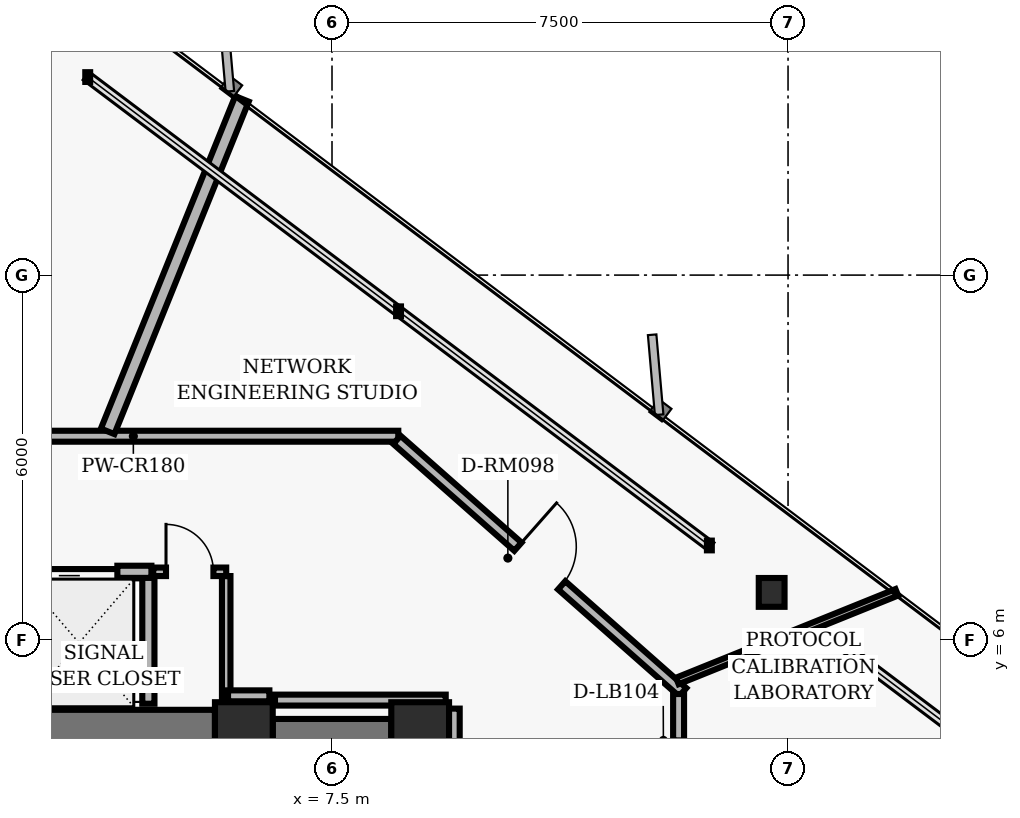
"""IFC4 building model, lengths in metres.
Left out: names, types, materials, properties, quantities, classifications, styles, units other than length and angle.
Written with IfcOpenShell. Run it as: python <this file> out.ifc"""

import sys

from ifc_helpers import new_model, si_unit, direction, frame, frame_2d, origin, origin_2d, place, context, subcontext, project, spatial, rectangle, hollow_rectangle, i_section, extrude, element, fill, save


model = new_model("IFC4")
c1 = context("Model", 3, precision=1e-05, world=origin(), true_north=direction((0.0, 1.0)))
c2 = subcontext(c1, "Body", "Model", "MODEL_VIEW")
j1 = project(units=[si_unit("LENGTHUNIT", "METRE"), si_unit("PLANEANGLEUNIT", "RADIAN")], contexts=[c1])
p1 = place(None, origin())
s1 = spatial("IfcSite", under=j1, at=p1, CompositionType="ELEMENT")
p2 = place(p1, origin())
s2 = spatial("IfcBuilding", under=s1, at=p2, CompositionType="ELEMENT")
p3 = place(p2, frame((0.0, 0.0, 49.6)))
s3 = spatial("IfcBuildingStorey", under=s2, at=p3, CompositionType="ELEMENT", Elevation=49.6)
for number, where, z_axis, x_axis in (
    (1, (6.05, 4.5, 0.0), (0.0, 0.0, 1.0), (1.0, 0.0, 0.0)),
    (2, (8.95, 4.5, 0.0), (0.0, 0.0, 1.0), (1.0, 0.0, 0.0)),
):
    element("IfcColumn", number, at=place(p3, frame(where, z_axis=z_axis, x_axis=x_axis)), inside=s3, PredefinedType="COLUMN", context=c2, shape_type="SweptSolid", body=[
        extrude(hollow_rectangle(XDim=0.95, YDim=0.95, WallThickness=0.06, InnerFilletRadius=0.02, OuterFilletRadius=0.04, at=origin_2d()), origin(), (0.0, 0.0, 1.0), 3.36),
    ])
p4 = place(p3, frame((2.05, 4.5, 0.0), z_axis=(0.0, 0.0, 1.0), x_axis=(1.0, 0.0, 0.0)))
e3 = element("IfcWall", 3, at=p4, inside=s3, PredefinedType="SHEAR", context=c2, shape_type="SweptSolid", body=[
    extrude(rectangle(XDim=3.525, YDim=0.7, at=frame_2d((1.762, 0.0))), origin(), (0.0, 0.0, 1.0), 3.098),
])
p5 = place(p3, frame((6.525, 4.5, 0.0), z_axis=(0.0, 0.0, 1.0), x_axis=(1.0, 0.0, 0.0)))
e4 = element("IfcWall", 4, at=p5, inside=s3, PredefinedType="SHEAR", context=c2, shape_type="SweptSolid", body=[
    extrude(rectangle(XDim=1.95, YDim=0.4, at=frame_2d((0.975, 0.0))), origin(), (0.0, 0.0, 1.0), 3.098),
])
p6 = place(p3, frame((14.73, 6.781, 0.0), z_axis=(0.0, 0.0, 1.0), x_axis=(1.0, 0.0, 0.0)))
e5 = element("IfcColumn", 5, at=p6, inside=s3, PredefinedType="COLUMN", context=c2, shape_type="SweptSolid", body=[
    extrude(i_section(OverallWidth=0.424, OverallDepth=0.474, WebThickness=0.048, FlangeThickness=0.077, FilletRadius=0.025, at=origin_2d()), origin(), (0.0, 0.0, 1.0), 3.36),
])
p7 = place(p3, frame((4.48, 4.95, 0.0), z_axis=(0.0, 0.0, 1.0), x_axis=(0.0, 1.0, 0.0)))
e6 = element("IfcWall", 6, at=p7, inside=s3, PredefinedType="PARTITIONING", context=c2, shape_type="SweptSolid", body=[
    extrude(rectangle(XDim=2.1, YDim=0.2, at=frame_2d((1.05, 0.0))), origin(), (0.0, 0.0, 1.0), 3.073),
])
p8 = place(p3, frame((2.15, 7.12, 0.0), z_axis=(0.0, 0.0, 1.0), x_axis=(1.0, 0.0, 0.0)))
e7 = element("IfcWall", 7, at=p8, inside=s3, PredefinedType="PARTITIONING", context=c2, shape_type="SweptSolid", body=[
    extrude(rectangle(XDim=2.38, YDim=0.2, at=frame_2d((1.19, 0.0))), origin(), (0.0, 0.0, 1.0), 2.587),
])
p9 = place(p8, frame((0.56, 0.0, 0.0)))
e8 = element("IfcOpeningElement", 8, at=p9, cuts=e7, PredefinedType="OPENING", context=c2, shape_type="SweptSolid", body=[
    extrude(rectangle(XDim=1.26, YDim=2.06, at=frame_2d((0.63, 1.03))), frame((0.0, 0.11, 0.0), z_axis=(0.0, -1.0, 0.0), x_axis=(1.0, 0.0, 0.0)), (0.0, 0.0, 1.0), 0.22),
])
p10 = place(p3, frame((5.76, 4.95, 0.0), z_axis=(0.0, 0.0, 1.0), x_axis=(0.0, 1.0, 0.0)))
e9 = element("IfcWall", 9, at=p10, inside=s3, PredefinedType="PARTITIONING", context=c2, shape_type="SweptSolid", body=[
    extrude(rectangle(XDim=2.1, YDim=0.14, at=frame_2d((1.05, 0.0))), origin(), (0.0, 0.0, 1.0), 3.073),
])
p11 = place(p3, frame((4.56, 7.12, 0.0), z_axis=(0.0, 0.0, 1.0), x_axis=(1.0, 0.0, 0.0)))
e10 = element("IfcWall", 10, at=p11, inside=s3, PredefinedType="PARTITIONING", context=c2, shape_type="SweptSolid", body=[
    extrude(rectangle(XDim=1.2, YDim=0.14, at=frame_2d((0.6, 0.0))), origin(), (0.0, 0.0, 1.0), 2.587),
])
p12 = place(p11, frame((0.21, 0.0, 0.0)))
e11 = element("IfcOpeningElement", 11, at=p12, cuts=e10, PredefinedType="OPENING", context=c2, shape_type="SweptSolid", body=[
    extrude(rectangle(XDim=0.78, YDim=2.01, at=frame_2d((0.39, 1.005))), frame((0.0, 0.08, 0.0), z_axis=(0.0, -1.0, 0.0), x_axis=(1.0, 0.0, 0.0)), (0.0, 0.0, 1.0), 0.16),
])
p13 = place(p3, frame((-8.59, 9.35, 0.0), z_axis=(0.0, 0.0, 1.0), x_axis=(1.0, 0.0, 0.0)))
e12 = element("IfcWall", 12, at=p13, inside=s3, PredefinedType="PARTITIONING", context=c2, shape_type="SweptSolid", body=[
    extrude(rectangle(XDim=17.18, YDim=0.18, at=frame_2d((8.59, 0.0))), origin(), (0.0, 0.0, 1.0), 3.073),
])
p14 = place(p13, frame((7.506, 0.0, 0.0)))
e13 = element("IfcOpeningElement", 13, at=p14, cuts=e12, PredefinedType="OPENING", context=c2, shape_type="SweptSolid", body=[
    extrude(rectangle(XDim=0.96, YDim=2.02, at=frame_2d((0.48, 1.01))), frame((0.0, 0.1, 0.0), z_axis=(0.0, -1.0, 0.0), x_axis=(1.0, 0.0, 0.0)), (0.0, 0.0, 1.0), 0.2),
])
p15 = place(p3, frame((8.567, 9.29, 0.0), z_axis=(0.0, 0.0, 1.0), x_axis=(0.749626463267, -0.66186113768, 0.0)))
e14 = element("IfcWall", 14, at=p15, inside=s3, PredefinedType="PARTITIONING", context=c2, shape_type="SweptSolid", body=[
    extrude(rectangle(XDim=6.27, YDim=0.18, at=frame_2d((3.135, 0.0))), origin(), (0.0, 0.0, 1.0), 2.587),
])
p16 = place(p15, frame((2.655, 0.0, 0.0)))
e15 = element("IfcOpeningElement", 15, at=p16, cuts=e14, PredefinedType="OPENING", context=c2, shape_type="SweptSolid", body=[
    extrude(rectangle(XDim=0.96, YDim=2.02, at=frame_2d((0.48, 1.01))), frame((0.0, 0.1, 0.0), z_axis=(0.0, -1.0, 0.0), x_axis=(1.0, 0.0, 0.0)), (0.0, 0.0, 1.0), 0.2),
])
p17 = place(p3, frame((13.2, 5.11, 0.0), z_axis=(0.0, 0.0, 1.0), x_axis=(0.0, -1.0, 0.0)))
e16 = element("IfcWall", 16, at=p17, inside=s3, PredefinedType="PARTITIONING", context=c2, shape_type="SweptSolid", body=[
    extrude(rectangle(XDim=10.22, YDim=0.18, at=frame_2d((5.11, 0.0))), origin(), (0.0, 0.0, 1.0), 3.073),
])
p18 = place(p17, frame((5.644, 0.0, 0.0)))
e17 = element("IfcOpeningElement", 17, at=p18, cuts=e16, PredefinedType="OPENING", context=c2, shape_type="SweptSolid", body=[
    extrude(rectangle(XDim=0.96, YDim=2.02, at=frame_2d((0.48, 1.01))), frame((0.0, 0.1, 0.0), z_axis=(0.0, -1.0, 0.0), x_axis=(1.0, 0.0, 0.0)), (0.0, 0.0, 1.0), 0.2),
])
p19 = place(p17, frame((0.763, 0.0, 0.0)))
e18 = element("IfcOpeningElement", 18, at=p19, cuts=e16, PredefinedType="OPENING", context=c2, shape_type="SweptSolid", body=[
    extrude(rectangle(XDim=1.02, YDim=2.02, at=frame_2d((0.51, 1.01))), frame((0.0, 0.1, 0.0), z_axis=(0.0, -1.0, 0.0), x_axis=(1.0, 0.0, 0.0)), (0.0, 0.0, 1.0), 0.2),
])
p20 = place(p3, frame((9.51, -4.87, 0.0), z_axis=(0.0, 0.0, 1.0), x_axis=(0.0, 1.0, 0.0)))
e19 = element("IfcWall", 19, at=p20, inside=s3, PredefinedType="PARTITIONING", context=c2, shape_type="SweptSolid", body=[
    extrude(rectangle(XDim=9.74, YDim=0.18, at=frame_2d((4.87, 0.0))), origin(), (0.0, 0.0, 1.0), 3.073),
])
p21 = place(p3, frame((9.37, 5.01, 0.0), z_axis=(0.0, 0.0, 1.0), x_axis=(-1.0, 0.0, 0.0)))
e20 = element("IfcWall", 20, at=p21, inside=s3, PredefinedType="PARTITIONING", context=c2, shape_type="SweptSolid", body=[
    extrude(rectangle(XDim=2.808, YDim=0.18, at=frame_2d((1.404, 0.0))), origin(), (0.0, 0.0, 1.0), 3.073),
])
p22 = place(p3, frame((6.47, 5.08, 0.0), z_axis=(0.0, 0.0, 1.0), x_axis=(-1.0, 0.0, 0.0)))
e21 = element("IfcWall", 21, at=p22, inside=s3, PredefinedType="PARTITIONING", context=c2, shape_type="SweptSolid", body=[
    extrude(rectangle(XDim=0.68, YDim=0.18, at=frame_2d((0.34, 0.0))), origin(), (0.0, 0.0, 1.0), 3.073),
])
p23 = place(p3, frame((13.179, 5.325, 0.0), z_axis=(0.0, 0.0, 1.0), x_axis=(0.927199532139, 0.374567787725, 0.0)))
e22 = element("IfcWall", 22, at=p23, inside=s3, PredefinedType="MOVABLE", context=c2, shape_type="SweptSolid", body=[
    extrude(rectangle(XDim=3.893, YDim=0.115, at=frame_2d((1.946, 0.0))), origin(), (0.0, 0.0, 1.0), 3.073),
])
p24 = place(p3, frame((3.81, 9.43, 0.0), z_axis=(0.0, 0.0, 1.0), x_axis=(0.374593091461, 0.927189309596, 0.0)))
e23 = element("IfcWall", 23, at=p24, inside=s3, PredefinedType="PARTITIONING", context=c2, shape_type="SweptSolid", body=[
    extrude(rectangle(XDim=5.898, YDim=0.24, at=frame_2d((2.949, 0.0))), origin(), (0.0, 0.0, 1.0), 3.073),
])
p25 = place(p9, origin())
e24 = element("IfcDoor", 24, at=p25, inside=s3, OperationType="SLIDING_TO_LEFT", PredefinedType="DOOR", context=c2, shape_type="SweptSolid", body=[
    extrude(rectangle(XDim=1.26, YDim=2.06, at=frame_2d((0.63, 1.03))), frame((0.0, 0.025, 0.0), z_axis=(0.0, -1.0, 0.0), x_axis=(1.0, 0.0, 0.0)), (0.0, 0.0, 1.0), 0.05),
])
fill(e8, e24)
p26 = place(p12, origin())
e25 = element("IfcDoor", 25, at=p26, inside=s3, OperationType="SINGLE_SWING_LEFT", PredefinedType="DOOR", context=c2, shape_type="SweptSolid", body=[
    extrude(rectangle(XDim=0.78, YDim=2.01, at=frame_2d((0.39, 1.005))), frame((0.0, 0.025, 0.0), z_axis=(0.0, -1.0, 0.0), x_axis=(1.0, 0.0, 0.0)), (0.0, 0.0, 1.0), 0.05),
])
fill(e11, e25)
p27 = place(p16, origin())
e26 = element("IfcDoor", 26, at=p27, inside=s3, OperationType="SINGLE_SWING_LEFT", PredefinedType="DOOR", context=c2, shape_type="SweptSolid", body=[
    extrude(rectangle(XDim=0.96, YDim=2.02, at=frame_2d((0.48, 1.01))), frame((0.0, 0.025, 0.0), z_axis=(0.0, -1.0, 0.0), x_axis=(1.0, 0.0, 0.0)), (0.0, 0.0, 1.0), 0.05),
])
fill(e15, e26)
save(model, sys.argv[1])
